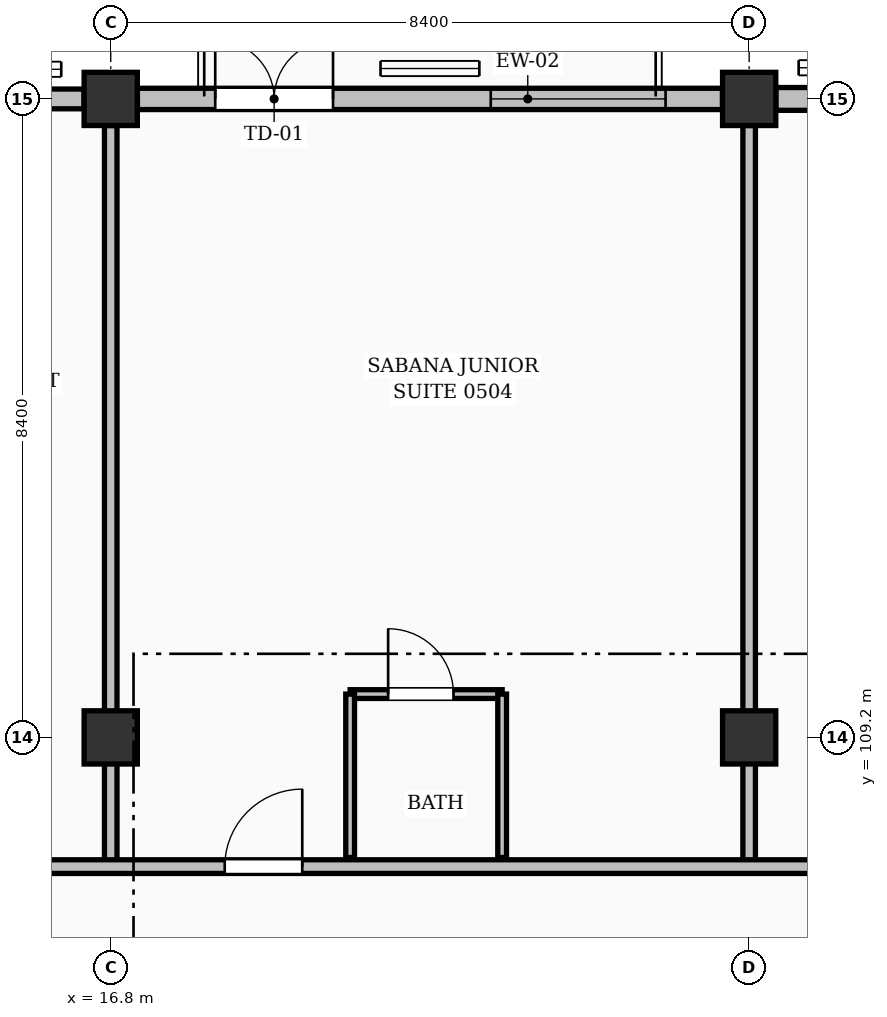
"""IFC4 building model, lengths in metres.
Left out: names, types, materials, properties, quantities, classifications, styles, units other than length and angle.
Written with IfcOpenShell. Run it as: python <this file> out.ifc"""

import sys

from ifc_helpers import new_model, si_unit, direction, frame, frame_2d, origin, origin_2d, place, context, subcontext, project, spatial, rectangle, extrude, element, fill, save


model = new_model("IFC4")
c1 = context("Model", 3, precision=1e-05, world=origin(), true_north=direction((0.0, 1.0)))
c2 = subcontext(c1, "Body", "Model", "MODEL_VIEW")
j1 = project(units=[si_unit("LENGTHUNIT", "METRE"), si_unit("PLANEANGLEUNIT", "RADIAN")], contexts=[c1])
p1 = place(None, origin())
s1 = spatial("IfcSite", under=j1, at=p1, CompositionType="ELEMENT")
p2 = place(p1, origin())
s2 = spatial("IfcBuilding", under=s1, at=p2, CompositionType="ELEMENT")
p3 = place(p2, frame((0.0, 0.0, 18.48)))
s3 = spatial("IfcBuildingStorey", under=s2, at=p3, CompositionType="ELEMENT", Elevation=18.48)
for number, where, z_axis, x_axis in (
    (1, (16.8, 109.2, 0.0), (0.0, 0.0, 1.0), (1.0, 0.0, 0.0)),
    (2, (16.8, 117.6, 0.0), (0.0, 0.0, 1.0), (1.0, 0.0, 0.0)),
    (3, (25.2, 109.2, 0.0), (0.0, 0.0, 1.0), (1.0, 0.0, 0.0)),
    (4, (25.2, 117.6, 0.0), (0.0, 0.0, 1.0), (1.0, 0.0, 0.0)),
):
    element("IfcColumn", number, at=place(p3, frame(where, z_axis=z_axis, x_axis=x_axis)), inside=s3, PredefinedType="COLUMN", context=c2, shape_type="SweptSolid", body=[
        extrude(rectangle(XDim=0.7, YDim=0.7, at=origin_2d()), origin(), (0.0, 0.0, 1.0), 3.36),
    ])
p4 = place(p3, frame((8.751, 117.6, 0.0), z_axis=(0.0, 0.0, 1.0), x_axis=(1.0, 0.0, 0.0)))
e5 = element("IfcWall", 5, at=p4, inside=s3, PredefinedType="SOLIDWALL", context=c2, shape_type="SweptSolid", body=[
    extrude(rectangle(XDim=7.698, YDim=0.26, at=frame_2d((3.849, 0.0))), origin(), (0.0, 0.0, 1.0), 2.494),
])
p5 = place(p4, frame((0.624, 0.0, 0.25)))
e6 = element("IfcOpeningElement", 6, at=p5, cuts=e5, PredefinedType="OPENING", context=c2, shape_type="SweptSolid", body=[
    extrude(rectangle(XDim=2.25, YDim=2.05, at=frame_2d((1.125, 1.025))), frame((0.0, 0.14, 0.0), z_axis=(0.0, -1.0, 0.0), x_axis=(1.0, 0.0, 0.0)), (0.0, 0.0, 1.0), 0.28),
])
p6 = place(p4, frame((4.799, 0.0, 0.25)))
e7 = element("IfcOpeningElement", 7, at=p6, cuts=e5, PredefinedType="OPENING", context=c2, shape_type="SweptSolid", body=[
    extrude(rectangle(XDim=2.3, YDim=1.75, at=frame_2d((1.15, 0.875))), frame((0.0, 0.14, 0.0), z_axis=(0.0, -1.0, 0.0), x_axis=(1.0, 0.0, 0.0)), (0.0, 0.0, 1.0), 0.28),
])
p7 = place(p3, frame((17.151, 117.6, 0.0), z_axis=(0.0, 0.0, 1.0), x_axis=(1.0, 0.0, 0.0)))
e8 = element("IfcWall", 8, at=p7, inside=s3, PredefinedType="SOLIDWALL", context=c2, shape_type="SweptSolid", body=[
    extrude(rectangle(XDim=7.698, YDim=0.28, at=frame_2d((3.849, 0.0))), origin(), (0.0, 0.0, 1.0), 2.494),
])
p8 = place(p7, frame((1.024, 0.0, 0.0)))
e9 = element("IfcOpeningElement", 9, at=p8, cuts=e8, PredefinedType="OPENING", context=c2, shape_type="SweptSolid", body=[
    extrude(rectangle(XDim=1.55, YDim=2.08, at=frame_2d((0.775, 1.04))), frame((0.0, 0.15, 0.0), z_axis=(0.0, -1.0, 0.0), x_axis=(1.0, 0.0, 0.0)), (0.0, 0.0, 1.0), 0.3),
])
p9 = place(p7, frame((4.649, 0.0, 0.25)))
e10 = element("IfcOpeningElement", 10, at=p9, cuts=e8, PredefinedType="OPENING", context=c2, shape_type="SweptSolid", body=[
    extrude(rectangle(XDim=2.3, YDim=1.75, at=frame_2d((1.15, 0.875))), frame((0.0, 0.15, 0.0), z_axis=(0.0, -1.0, 0.0), x_axis=(1.0, 0.0, 0.0)), (0.0, 0.0, 1.0), 0.3),
])
p10 = place(p3, frame((25.551, 117.6, 0.0), z_axis=(0.0, 0.0, 1.0), x_axis=(1.0, 0.0, 0.0)))
e11 = element("IfcWall", 11, at=p10, inside=s3, PredefinedType="SOLIDWALL", context=c2, shape_type="SweptSolid", body=[
    extrude(rectangle(XDim=7.698, YDim=0.3, at=frame_2d((3.849, 0.0))), origin(), (0.0, 0.0, 1.0), 2.494),
])
p11 = place(p10, frame((0.549, 0.0, 0.25)))
e12 = element("IfcOpeningElement", 12, at=p11, cuts=e11, PredefinedType="OPENING", context=c2, shape_type="SweptSolid", body=[
    extrude(rectangle(XDim=2.4, YDim=1.75, at=frame_2d((1.2, 0.875))), frame((0.0, 0.16, 0.0), z_axis=(0.0, -1.0, 0.0), x_axis=(1.0, 0.0, 0.0)), (0.0, 0.0, 1.0), 0.32),
])
p12 = place(p10, frame((4.789, 0.0, 0.25)))
e13 = element("IfcOpeningElement", 13, at=p12, cuts=e11, PredefinedType="OPENING", context=c2, shape_type="SweptSolid", body=[
    extrude(rectangle(XDim=2.32, YDim=1.9, at=frame_2d((1.16, 0.95))), frame((0.0, 0.16, 0.0), z_axis=(0.0, -1.0, 0.0), x_axis=(1.0, 0.0, 0.0)), (0.0, 0.0, 1.0), 0.32),
])
p13 = place(p3, frame((19.95, 109.77, 0.0), z_axis=(0.0, 0.0, 1.0), x_axis=(1.0, 0.0, 0.0)))
e14 = element("IfcWall", 14, at=p13, inside=s3, PredefinedType="PARTITIONING", context=c2, shape_type="SweptSolid", body=[
    extrude(rectangle(XDim=2.0, YDim=0.115, at=frame_2d((1.0, 0.0))), origin(), (0.0, 0.0, 1.0), 3.12),
])
p14 = place(p13, frame((0.5, 0.0, 0.0)))
e15 = element("IfcOpeningElement", 15, at=p14, cuts=e14, PredefinedType="OPENING", context=c2, shape_type="SweptSolid", body=[
    extrude(rectangle(XDim=0.86, YDim=2.05, at=frame_2d((0.43, 1.025))), frame((0.0, 0.067, 0.0), z_axis=(0.0, -1.0, 0.0), x_axis=(1.0, 0.0, 0.0)), (0.0, 0.0, 1.0), 0.135),
])
for number, where, z_axis, x_axis in (
    (16, (19.95, 107.62, 0.0), (0.0, 0.0, 1.0), (0.0, 1.0, 0.0)),
    (17, (21.95, 107.62, 0.0), (0.0, 0.0, 1.0), (0.0, 1.0, 0.0)),
):
    element("IfcWall", number, at=place(p3, frame(where, z_axis=z_axis, x_axis=x_axis)), inside=s3, PredefinedType="PARTITIONING", context=c2, shape_type="SweptSolid", body=[
        extrude(rectangle(XDim=2.15, YDim=0.115, at=frame_2d((1.075, 0.0))), origin(), (0.0, 0.0, 1.0), 3.12),
    ])
for number, where, z_axis, x_axis in (
    (18, (16.8, 107.5, 0.0), (0.0, 0.0, 1.0), (0.0, 1.0, 0.0)),
    (19, (25.2, 107.5, 0.0), (0.0, 0.0, 1.0), (0.0, 1.0, 0.0)),
):
    element("IfcWall", number, at=place(p3, frame(where, z_axis=z_axis, x_axis=x_axis)), inside=s3, PredefinedType="PARTITIONING", context=c2, shape_type="SweptSolid", body=[
        extrude(rectangle(XDim=9.75, YDim=0.165, at=frame_2d((4.875, 0.0))), origin(), (0.0, 0.0, 1.0), 2.455),
    ])
p15 = place(p3, frame((0.13, 107.5, 0.0), z_axis=(0.0, 0.0, 1.0), x_axis=(1.0, 0.0, 0.0)))
e20 = element("IfcWall", 20, at=p15, inside=s3, PredefinedType="PARTITIONING", context=c2, shape_type="SweptSolid", body=[
    extrude(rectangle(XDim=34.24, YDim=0.18, at=frame_2d((17.12, 0.0))), origin(), (0.0, 0.0, 1.0), 3.12),
])
p16 = place(p15, frame((1.37, 0.0, 0.0)))
e21 = element("IfcOpeningElement", 21, at=p16, cuts=e20, PredefinedType="OPENING", context=c2, shape_type="SweptSolid", body=[
    extrude(rectangle(XDim=1.02, YDim=2.15, at=frame_2d((0.51, 1.075))), frame((0.0, 0.1, 0.0), z_axis=(0.0, -1.0, 0.0), x_axis=(1.0, 0.0, 0.0)), (0.0, 0.0, 1.0), 0.2),
])
p17 = place(p15, frame((9.64, 0.0, 0.0)))
e22 = element("IfcOpeningElement", 22, at=p17, cuts=e20, PredefinedType="OPENING", context=c2, shape_type="SweptSolid", body=[
    extrude(rectangle(XDim=0.96, YDim=2.15, at=frame_2d((0.48, 1.075))), frame((0.0, 0.1, 0.0), z_axis=(0.0, -1.0, 0.0), x_axis=(1.0, 0.0, 0.0)), (0.0, 0.0, 1.0), 0.2),
])
p18 = place(p15, frame((14.3, 0.0, 0.0)))
e23 = element("IfcOpeningElement", 23, at=p18, cuts=e20, PredefinedType="OPENING", context=c2, shape_type="SweptSolid", body=[
    extrude(rectangle(XDim=0.96, YDim=2.15, at=frame_2d((0.48, 1.075))), frame((0.0, 0.1, 0.0), z_axis=(0.0, -1.0, 0.0), x_axis=(1.0, 0.0, 0.0)), (0.0, 0.0, 1.0), 0.2),
])
p19 = place(p15, frame((18.17, 0.0, 0.0)))
e24 = element("IfcOpeningElement", 24, at=p19, cuts=e20, PredefinedType="OPENING", context=c2, shape_type="SweptSolid", body=[
    extrude(rectangle(XDim=1.02, YDim=2.15, at=frame_2d((0.51, 1.075))), frame((0.0, 0.1, 0.0), z_axis=(0.0, -1.0, 0.0), x_axis=(1.0, 0.0, 0.0)), (0.0, 0.0, 1.0), 0.2),
])
p20 = place(p15, frame((26.44, 0.0, 0.0)))
e25 = element("IfcOpeningElement", 25, at=p20, cuts=e20, PredefinedType="OPENING", context=c2, shape_type="SweptSolid", body=[
    extrude(rectangle(XDim=0.96, YDim=2.15, at=frame_2d((0.48, 1.075))), frame((0.0, 0.1, 0.0), z_axis=(0.0, -1.0, 0.0), x_axis=(1.0, 0.0, 0.0)), (0.0, 0.0, 1.0), 0.2),
])
p21 = place(p15, frame((31.1, 0.0, 0.0)))
e26 = element("IfcOpeningElement", 26, at=p21, cuts=e20, PredefinedType="OPENING", context=c2, shape_type="SweptSolid", body=[
    extrude(rectangle(XDim=0.96, YDim=2.15, at=frame_2d((0.48, 1.075))), frame((0.0, 0.1, 0.0), z_axis=(0.0, -1.0, 0.0), x_axis=(1.0, 0.0, 0.0)), (0.0, 0.0, 1.0), 0.2),
])
p22 = place(p8, origin())
e27 = element("IfcDoor", 27, at=p22, inside=s3, OperationType="DOUBLE_DOOR_SINGLE_SWING", PredefinedType="DOOR", context=c2, shape_type="SweptSolid", body=[
    extrude(rectangle(XDim=1.55, YDim=2.08, at=frame_2d((0.775, 1.04))), frame((0.0, 0.025, 0.0), z_axis=(0.0, -1.0, 0.0), x_axis=(1.0, 0.0, 0.0)), (0.0, 0.0, 1.0), 0.05),
])
fill(e9, e27)
p23 = place(p9, origin())
e28 = element("IfcWindow", 28, at=p23, inside=s3, PartitioningType="DOUBLE_PANEL_VERTICAL", PredefinedType="WINDOW", context=c2, shape_type="SweptSolid", body=[
    extrude(rectangle(XDim=2.3, YDim=1.75, at=frame_2d((1.15, 0.875))), frame((0.0, 0.03, 0.0), z_axis=(0.0, -1.0, 0.0), x_axis=(1.0, 0.0, 0.0)), (0.0, 0.0, 1.0), 0.06),
])
fill(e10, e28)
p24 = place(p14, origin())
e29 = element("IfcDoor", 29, at=p24, inside=s3, OperationType="SINGLE_SWING_LEFT", PredefinedType="DOOR", context=c2, shape_type="SweptSolid", body=[
    extrude(rectangle(XDim=0.86, YDim=2.05, at=frame_2d((0.43, 1.025))), frame((0.0, 0.025, 0.0), z_axis=(0.0, -1.0, 0.0), x_axis=(1.0, 0.0, 0.0)), (0.0, 0.0, 1.0), 0.05),
])
fill(e15, e29)
p25 = place(p19, origin())
e30 = element("IfcDoor", 30, at=p25, inside=s3, OperationType="SINGLE_SWING_RIGHT", PredefinedType="DOOR", context=c2, shape_type="SweptSolid", body=[
    extrude(rectangle(XDim=1.02, YDim=2.15, at=frame_2d((0.51, 1.075))), frame((0.0, 0.025, 0.0), z_axis=(0.0, -1.0, 0.0), x_axis=(1.0, 0.0, 0.0)), (0.0, 0.0, 1.0), 0.05),
])
fill(e24, e30)
save(model, sys.argv[1])
